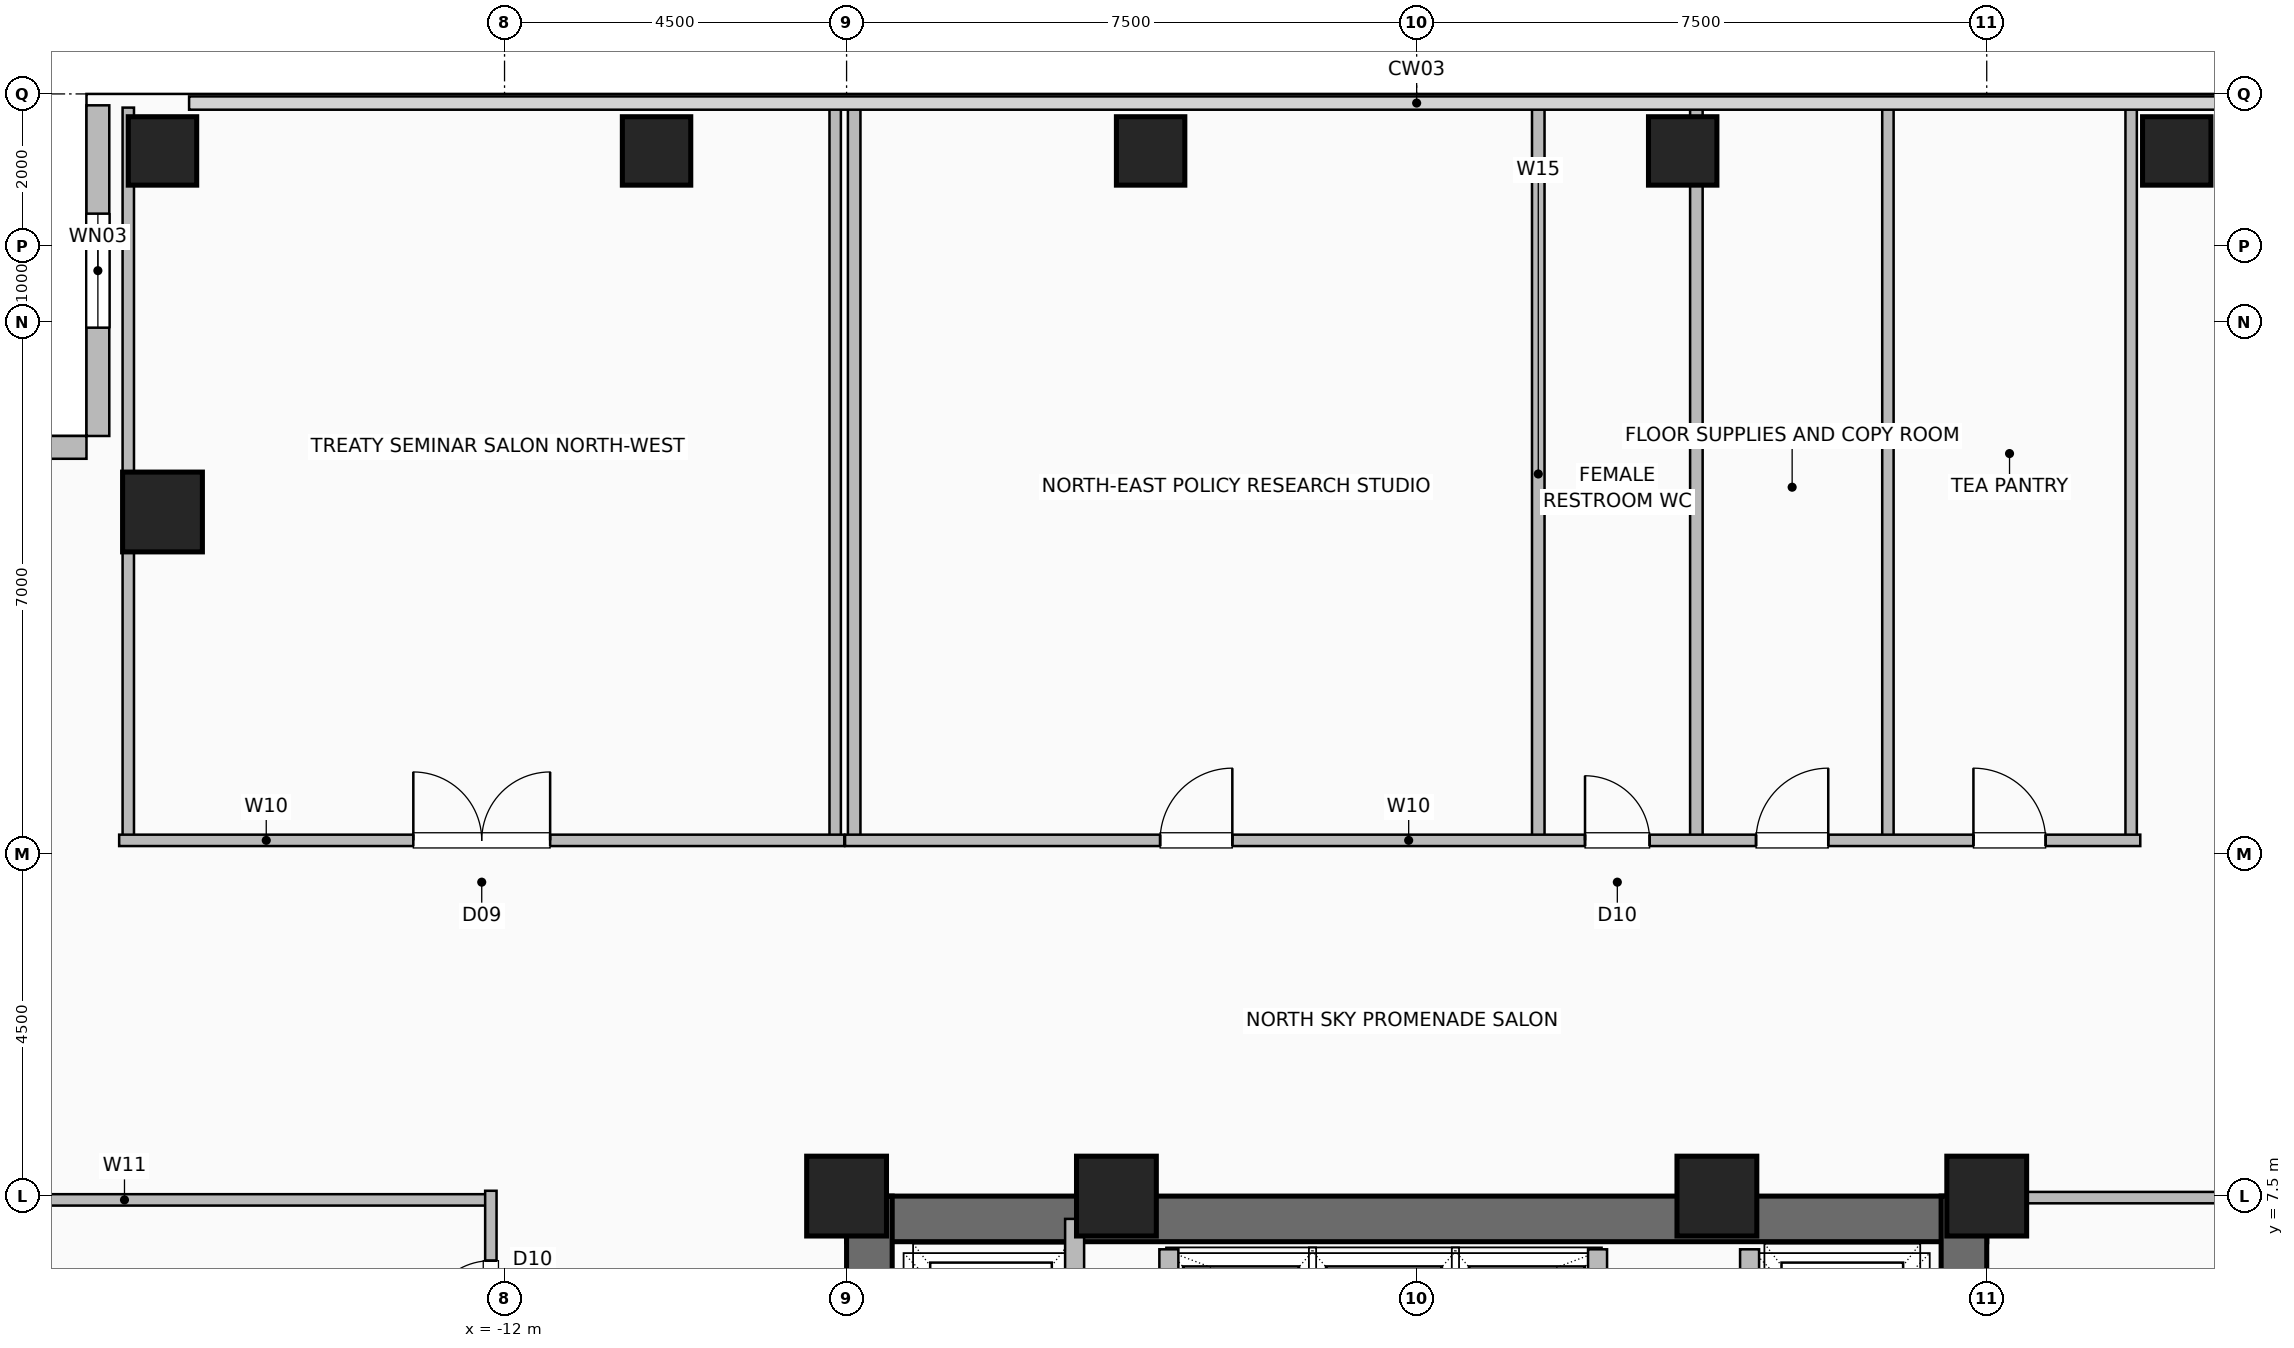
"""IFC4 building model, lengths in metres.
Left out: names, types, materials, properties, quantities, classifications, styles, units other than length and angle.
Written with IfcOpenShell. Run it as: python <this file> out.ifc"""

import sys

from ifc_helpers import new_model, si_unit, direction, frame, frame_2d, origin, origin_2d, place, context, subcontext, project, spatial, rectangle, hollow_rectangle, extrude, element, fill, save


model = new_model("IFC4")
c1 = context("Model", 3, precision=1e-05, world=origin(), true_north=direction((0.0, 1.0)))
c2 = subcontext(c1, "Body", "Model", "MODEL_VIEW")
j1 = project(units=[si_unit("LENGTHUNIT", "METRE"), si_unit("PLANEANGLEUNIT", "RADIAN")], contexts=[c1])
p1 = place(None, origin())
s1 = spatial("IfcSite", under=j1, at=p1, CompositionType="ELEMENT")
p2 = place(p1, origin())
s2 = spatial("IfcBuilding", under=s1, at=p2, CompositionType="ELEMENT")
p3 = place(p2, frame((0.0, 0.0, 97.6)))
s3 = spatial("IfcBuildingStorey", under=s2, at=p3, CompositionType="ELEMENT", Elevation=97.6)
for number, where, z_axis, x_axis in (
    (1, (7.5, 7.5, 0.0), (0.0, 0.0, 1.0), (1.0, 0.0, 0.0)),
    (2, (3.95, 7.5, 0.0), (0.0, 0.0, 1.0), (1.0, 0.0, 0.0)),
    (3, (-3.95, 7.5, 0.0), (0.0, 0.0, 1.0), (1.0, 0.0, 0.0)),
    (4, (-7.5, 7.5, 0.0), (0.0, 0.0, 1.0), (1.0, 0.0, 0.0)),
):
    element("IfcColumn", number, at=place(p3, frame(where, z_axis=z_axis, x_axis=x_axis)), inside=s3, PredefinedType="COLUMN", context=c2, shape_type="SweptSolid", body=[
        extrude(hollow_rectangle(XDim=1.05, YDim=1.05, WallThickness=0.05, at=origin_2d()), origin(), (0.0, 0.0, 1.0), 3.6),
    ])
for number, where, z_axis, x_axis in (
    (5, (-16.5, 21.25, 0.0), (0.0, 0.0, 1.0), (1.0, 0.0, 0.0)),
    (6, (-10.0, 21.25, 0.0), (0.0, 0.0, 1.0), (1.0, 0.0, 0.0)),
    (7, (-3.5, 21.25, 0.0), (0.0, 0.0, 1.0), (1.0, 0.0, 0.0)),
    (8, (3.5, 21.25, 0.0), (0.0, 0.0, 1.0), (1.0, 0.0, 0.0)),
    (9, (10.0, 21.25, 0.0), (0.0, 0.0, 1.0), (1.0, 0.0, 0.0)),
):
    element("IfcColumn", number, at=place(p3, frame(where, z_axis=z_axis, x_axis=x_axis)), inside=s3, PredefinedType="COLUMN", context=c2, shape_type="SweptSolid", body=[
        extrude(hollow_rectangle(XDim=0.9, YDim=0.9, WallThickness=0.045, at=origin_2d()), origin(), (0.0, 0.0, 1.0), 3.6),
    ])
p4 = place(p3, frame((-16.5, 16.5, 0.0), z_axis=(0.0, 0.0, 1.0), x_axis=(1.0, 0.0, 0.0)))
e10 = element("IfcColumn", 10, at=p4, inside=s3, PredefinedType="COLUMN", context=c2, shape_type="SweptSolid", body=[
    extrude(hollow_rectangle(XDim=1.05, YDim=1.05, WallThickness=0.05, at=origin_2d()), origin(), (0.0, 0.0, 1.0), 3.6),
])
p5 = place(p3, frame((-17.35, 21.85, 0.0), z_axis=(0.0, 0.0, 1.0), x_axis=(0.0, -1.0, 0.0)))
e11 = element("IfcWall", 11, at=p5, inside=s3, PredefinedType="SOLIDWALL", context=c2, shape_type="SweptSolid", body=[
    extrude(rectangle(XDim=4.35, YDim=0.3, at=frame_2d((2.175, 0.0))), origin(), (0.0, 0.0, 1.0), 3.36),
])
p6 = place(p5, frame((1.425, 0.0, 0.9)))
e12 = element("IfcOpeningElement", 12, at=p6, cuts=e11, PredefinedType="OPENING", context=c2, shape_type="SweptSolid", body=[
    extrude(rectangle(XDim=1.5, YDim=1.8, at=frame_2d((0.75, 0.9))), frame((0.0, 0.16, 0.0), z_axis=(0.0, -1.0, 0.0), x_axis=(1.0, 0.0, 0.0)), (0.0, 0.0, 1.0), 0.32),
])
p7 = place(p3, frame((-21.85, 17.35, 0.0), z_axis=(0.0, 0.0, 1.0), x_axis=(1.0, 0.0, 0.0)))
e13 = element("IfcWall", 13, at=p7, inside=s3, PredefinedType="SOLIDWALL", context=c2, shape_type="SweptSolid", body=[
    extrude(rectangle(XDim=4.35, YDim=0.3, at=frame_2d((2.175, 0.0))), origin(), (0.0, 0.0, 1.0), 3.36),
])
p8 = place(p3, frame((-7.5, 7.2, 0.0), z_axis=(0.0, 0.0, 1.0), x_axis=(1.0, 0.0, 0.0)))
e14 = element("IfcWall", 14, at=p8, inside=s3, PredefinedType="SHEAR", context=c2, shape_type="SweptSolid", body=[
    extrude(rectangle(XDim=15.0, YDim=0.6, at=frame_2d((7.5, 0.0))), origin(), (0.0, 0.0, 1.0), 3.36),
])
p9 = place(p3, frame((-7.2, -7.5, 0.0), z_axis=(0.0, 0.0, 1.0), x_axis=(0.0, 1.0, 0.0)))
e15 = element("IfcWall", 15, at=p9, inside=s3, PredefinedType="SHEAR", context=c2, shape_type="SweptSolid", body=[
    extrude(rectangle(XDim=15.0, YDim=0.6, at=frame_2d((7.5, 0.0))), origin(), (0.0, 0.0, 1.0), 3.36),
])
p10 = place(p9, frame((9.5, 0.0, 0.0)))
e16 = element("IfcOpeningElement", 16, at=p10, cuts=e15, PredefinedType="OPENING", context=c2, shape_type="SweptSolid", body=[
    extrude(rectangle(XDim=1.0, YDim=2.08, at=frame_2d((0.5, 1.04))), frame((0.0, 0.31, 0.0), z_axis=(0.0, -1.0, 0.0), x_axis=(1.0, 0.0, 0.0)), (0.0, 0.0, 1.0), 0.62),
])
p11 = place(p3, frame((7.2, -7.5, 0.0), z_axis=(0.0, 0.0, 1.0), x_axis=(0.0, 1.0, 0.0)))
e17 = element("IfcWall", 17, at=p11, inside=s3, PredefinedType="SHEAR", context=c2, shape_type="SweptSolid", body=[
    extrude(rectangle(XDim=15.0, YDim=0.6, at=frame_2d((7.5, 0.0))), origin(), (0.0, 0.0, 1.0), 3.36),
])
for number, where, z_axis, x_axis in (
    (18, (-3.26, 4.58, 0.0), (0.0, 0.0, 1.0), (0.0, 1.0, 0.0)),
    (19, (2.38, 4.58, 0.0), (0.0, 0.0, 1.0), (0.0, 1.0, 0.0)),
):
    element("IfcWall", number, at=place(p3, frame(where, z_axis=z_axis, x_axis=x_axis)), inside=s3, PredefinedType="SHEAR", context=c2, shape_type="SweptSolid", body=[
        extrude(rectangle(XDim=2.22, YDim=0.25, at=frame_2d((1.11, 0.0))), origin(), (0.0, 0.0, 1.0), 3.36),
    ])
p12 = place(p3, frame((-4.5, 4.35, 0.0), z_axis=(0.0, 0.0, 1.0), x_axis=(0.0, 1.0, 0.0)))
e20 = element("IfcWall", 20, at=p12, inside=s3, PredefinedType="SHEAR", context=c2, shape_type="SweptSolid", body=[
    extrude(rectangle(XDim=2.85, YDim=0.25, at=frame_2d((1.425, 0.0))), origin(), (0.0, 0.0, 1.0), 3.36),
])
p13 = place(p3, frame((4.38, 4.3, 0.0), z_axis=(0.0, 0.0, 1.0), x_axis=(0.0, 1.0, 0.0)))
e21 = element("IfcWall", 21, at=p13, inside=s3, PredefinedType="SHEAR", context=c2, shape_type="SweptSolid", body=[
    extrude(rectangle(XDim=2.5, YDim=0.25, at=frame_2d((1.25, 0.0))), origin(), (0.0, 0.0, 1.0), 3.36),
])
p14 = place(p13, frame((0.8, 0.0, 0.0)))
e22 = element("IfcOpeningElement", 22, at=p14, cuts=e21, PredefinedType="OPENING", context=c2, shape_type="SweptSolid", body=[
    extrude(rectangle(XDim=1.2, YDim=2.2, at=frame_2d((0.6, 1.1))), frame((0.0, 0.135, 0.0), z_axis=(0.0, -1.0, 0.0), x_axis=(1.0, 0.0, 0.0)), (0.0, 0.0, 1.0), 0.27),
])
p15 = place(p3, frame((-21.82, 7.45, 0.0), z_axis=(0.0, 0.0, 1.0), x_axis=(1.0, 0.0, 0.0)))
e23 = element("IfcWall", 23, at=p15, inside=s3, PredefinedType="PARTITIONING", context=c2, shape_type="SweptSolid", body=[
    extrude(rectangle(XDim=9.64, YDim=0.15, at=frame_2d((4.82, 0.0))), origin(), (0.0, 0.0, 1.0), 3.36),
])
p16 = place(p3, frame((-12.18, -7.57, 0.0), z_axis=(0.0, 0.0, 1.0), x_axis=(0.0, 1.0, 0.0)))
e24 = element("IfcWall", 24, at=p16, inside=s3, PredefinedType="PARTITIONING", context=c2, shape_type="SweptSolid", body=[
    extrude(rectangle(XDim=15.14, YDim=0.15, at=frame_2d((7.57, 0.0))), origin(), (0.0, 0.0, 1.0), 3.36),
])
p17 = place(p16, frame((2.62, 0.0, 0.0)))
e25 = element("IfcOpeningElement", 25, at=p17, cuts=e24, PredefinedType="OPENING", context=c2, shape_type="SweptSolid", body=[
    extrude(rectangle(XDim=0.95, YDim=2.06, at=frame_2d((0.475, 1.03))), frame((0.0, 0.085, 0.0), z_axis=(0.0, -1.0, 0.0), x_axis=(1.0, 0.0, 0.0)), (0.0, 0.0, 1.0), 0.17),
])
p18 = place(p16, frame((8.845, 0.0, 0.0)))
e26 = element("IfcOpeningElement", 26, at=p18, cuts=e24, PredefinedType="OPENING", context=c2, shape_type="SweptSolid", body=[
    extrude(rectangle(XDim=0.95, YDim=2.06, at=frame_2d((0.475, 1.03))), frame((0.0, 0.085, 0.0), z_axis=(0.0, -1.0, 0.0), x_axis=(1.0, 0.0, 0.0)), (0.0, 0.0, 1.0), 0.17),
])
p19 = place(p16, frame((13.37, 0.0, 0.0)))
e27 = element("IfcOpeningElement", 27, at=p19, cuts=e24, PredefinedType="OPENING", context=c2, shape_type="SweptSolid", body=[
    extrude(rectangle(XDim=0.85, YDim=2.05, at=frame_2d((0.425, 1.025))), frame((0.0, 0.085, 0.0), z_axis=(0.0, -1.0, 0.0), x_axis=(1.0, 0.0, 0.0)), (0.0, 0.0, 1.0), 0.17),
])
for number, where, z_axis, x_axis in (
    (28, (-16.95, 12.18, 0.0), (0.0, 0.0, 1.0), (0.0, 1.0, 0.0)),
    (29, (-7.65, 12.18, 0.0), (0.0, 0.0, 1.0), (0.0, 1.0, 0.0)),
):
    element("IfcWall", number, at=place(p3, frame(where, z_axis=z_axis, x_axis=x_axis)), inside=s3, PredefinedType="PARTITIONING", context=c2, shape_type="SweptSolid", body=[
        extrude(rectangle(XDim=9.64, YDim=0.15, at=frame_2d((4.82, 0.0))), origin(), (0.0, 0.0, 1.0), 3.36),
    ])
p20 = place(p3, frame((-17.07, 12.18, 0.0), z_axis=(0.0, 0.0, 1.0), x_axis=(1.0, 0.0, 0.0)))
e30 = element("IfcWall", 30, at=p20, inside=s3, PredefinedType="PARTITIONING", context=c2, shape_type="SweptSolid", body=[
    extrude(rectangle(XDim=9.54, YDim=0.15, at=frame_2d((4.77, 0.0))), origin(), (0.0, 0.0, 1.0), 3.36),
])
p21 = place(p20, frame((3.87, 0.0, 0.0)))
e31 = element("IfcOpeningElement", 31, at=p21, cuts=e30, PredefinedType="OPENING", context=c2, shape_type="SweptSolid", body=[
    extrude(rectangle(XDim=1.8, YDim=2.08, at=frame_2d((0.9, 1.04))), frame((0.0, 0.085, 0.0), z_axis=(0.0, -1.0, 0.0), x_axis=(1.0, 0.0, 0.0)), (0.0, 0.0, 1.0), 0.17),
])
for number, where, z_axis, x_axis in (
    (32, (3.68, 12.18, 0.0), (0.0, 0.0, 1.0), (0.0, 1.0, 0.0)),
    (33, (-7.4, 12.18, 0.0), (0.0, 0.0, 1.0), (0.0, 1.0, 0.0)),
    (34, (1.6, 12.18, 0.0), (0.0, 0.0, 1.0), (0.0, 1.0, 0.0)),
):
    element("IfcWall", number, at=place(p3, frame(where, z_axis=z_axis, x_axis=x_axis)), inside=s3, PredefinedType="PLUMBINGWALL", context=c2, shape_type="SweptSolid", body=[
        extrude(rectangle(XDim=9.64, YDim=0.165, at=frame_2d((4.82, 0.0))), origin(), (0.0, 0.0, 1.0), 3.36),
    ])
for number, where, z_axis, x_axis in (
    (35, (6.2, 12.18, 0.0), (0.0, 0.0, 1.0), (0.0, 1.0, 0.0)),
    (36, (9.4, 12.18, 0.0), (0.0, 0.0, 1.0), (0.0, 1.0, 0.0)),
):
    element("IfcWall", number, at=place(p3, frame(where, z_axis=z_axis, x_axis=x_axis)), inside=s3, PredefinedType="PARTITIONING", context=c2, shape_type="SweptSolid", body=[
        extrude(rectangle(XDim=9.64, YDim=0.15, at=frame_2d((4.82, 0.0))), origin(), (0.0, 0.0, 1.0), 3.36),
    ])
p22 = place(p3, frame((-7.52, 12.18, 0.0), z_axis=(0.0, 0.0, 1.0), x_axis=(1.0, 0.0, 0.0)))
e37 = element("IfcWall", 37, at=p22, inside=s3, PredefinedType="PARTITIONING", context=c2, shape_type="SweptSolid", body=[
    extrude(rectangle(XDim=17.04, YDim=0.15, at=frame_2d((8.52, 0.0))), origin(), (0.0, 0.0, 1.0), 3.36),
])
p23 = place(p22, frame((4.145, 0.0, 0.0)))
e38 = element("IfcOpeningElement", 38, at=p23, cuts=e37, PredefinedType="OPENING", context=c2, shape_type="SweptSolid", body=[
    extrude(rectangle(XDim=0.95, YDim=2.06, at=frame_2d((0.475, 1.03))), frame((0.0, 0.085, 0.0), z_axis=(0.0, -1.0, 0.0), x_axis=(1.0, 0.0, 0.0)), (0.0, 0.0, 1.0), 0.17),
])
p24 = place(p22, frame((9.735, 0.0, 0.0)))
e39 = element("IfcOpeningElement", 39, at=p24, cuts=e37, PredefinedType="OPENING", context=c2, shape_type="SweptSolid", body=[
    extrude(rectangle(XDim=0.85, YDim=2.05, at=frame_2d((0.425, 1.025))), frame((0.0, 0.085, 0.0), z_axis=(0.0, -1.0, 0.0), x_axis=(1.0, 0.0, 0.0)), (0.0, 0.0, 1.0), 0.17),
])
p25 = place(p22, frame((11.985, 0.0, 0.0)))
e40 = element("IfcOpeningElement", 40, at=p25, cuts=e37, PredefinedType="OPENING", context=c2, shape_type="SweptSolid", body=[
    extrude(rectangle(XDim=0.95, YDim=2.06, at=frame_2d((0.475, 1.03))), frame((0.0, 0.085, 0.0), z_axis=(0.0, -1.0, 0.0), x_axis=(1.0, 0.0, 0.0)), (0.0, 0.0, 1.0), 0.17),
])
p26 = place(p22, frame((14.845, 0.0, 0.0)))
e41 = element("IfcOpeningElement", 41, at=p26, cuts=e37, PredefinedType="OPENING", context=c2, shape_type="SweptSolid", body=[
    extrude(rectangle(XDim=0.95, YDim=2.06, at=frame_2d((0.475, 1.03))), frame((0.0, 0.085, 0.0), z_axis=(0.0, -1.0, 0.0), x_axis=(1.0, 0.0, 0.0)), (0.0, 0.0, 1.0), 0.17),
])
p27 = place(p3, frame((7.6, 7.48, 0.0), z_axis=(0.0, 0.0, 1.0), x_axis=(1.0, 0.0, 0.0)))
e42 = element("IfcWall", 42, at=p27, inside=s3, PredefinedType="PARTITIONING", context=c2, shape_type="SweptSolid", body=[
    extrude(rectangle(XDim=14.22, YDim=0.15, at=frame_2d((7.11, 0.0))), origin(), (0.0, 0.0, 1.0), 3.36),
])
p28 = place(p6, origin())
e43 = element("IfcWindow", 43, at=p28, inside=s3, PartitioningType="SINGLE_PANEL", PredefinedType="WINDOW", context=c2, shape_type="SweptSolid", body=[
    extrude(rectangle(XDim=1.5, YDim=1.8, at=frame_2d((0.75, 0.9))), frame((0.0, 0.03, 0.0), z_axis=(0.0, -1.0, 0.0), x_axis=(1.0, 0.0, 0.0)), (0.0, 0.0, 1.0), 0.06),
])
fill(e12, e43)
p29 = place(p19, origin())
e44 = element("IfcDoor", 44, at=p29, inside=s3, OperationType="SINGLE_SWING_LEFT", PredefinedType="DOOR", context=c2, shape_type="SweptSolid", body=[
    extrude(rectangle(XDim=0.85, YDim=2.05, at=frame_2d((0.425, 1.025))), frame((0.0, 0.025, 0.0), z_axis=(0.0, -1.0, 0.0), x_axis=(1.0, 0.0, 0.0)), (0.0, 0.0, 1.0), 0.05),
])
fill(e27, e44)
p30 = place(p21, origin())
e45 = element("IfcDoor", 45, at=p30, inside=s3, OperationType="DOUBLE_DOOR_SINGLE_SWING", PredefinedType="DOOR", context=c2, shape_type="SweptSolid", body=[
    extrude(rectangle(XDim=1.8, YDim=2.08, at=frame_2d((0.9, 1.04))), frame((0.0, 0.025, 0.0), z_axis=(0.0, -1.0, 0.0), x_axis=(1.0, 0.0, 0.0)), (0.0, 0.0, 1.0), 0.05),
])
fill(e31, e45)
p31 = place(p23, origin())
e46 = element("IfcDoor", 46, at=p31, inside=s3, OperationType="SINGLE_SWING_RIGHT", PredefinedType="DOOR", context=c2, shape_type="SweptSolid", body=[
    extrude(rectangle(XDim=0.95, YDim=2.06, at=frame_2d((0.475, 1.03))), frame((0.0, 0.025, 0.0), z_axis=(0.0, -1.0, 0.0), x_axis=(1.0, 0.0, 0.0)), (0.0, 0.0, 1.0), 0.05),
])
fill(e38, e46)
p32 = place(p24, origin())
e47 = element("IfcDoor", 47, at=p32, inside=s3, OperationType="SINGLE_SWING_LEFT", PredefinedType="DOOR", context=c2, shape_type="SweptSolid", body=[
    extrude(rectangle(XDim=0.85, YDim=2.05, at=frame_2d((0.425, 1.025))), frame((0.0, 0.025, 0.0), z_axis=(0.0, -1.0, 0.0), x_axis=(1.0, 0.0, 0.0)), (0.0, 0.0, 1.0), 0.05),
])
fill(e39, e47)
p33 = place(p25, origin())
e48 = element("IfcDoor", 48, at=p33, inside=s3, OperationType="SINGLE_SWING_RIGHT", PredefinedType="DOOR", context=c2, shape_type="SweptSolid", body=[
    extrude(rectangle(XDim=0.95, YDim=2.06, at=frame_2d((0.475, 1.03))), frame((0.0, 0.025, 0.0), z_axis=(0.0, -1.0, 0.0), x_axis=(1.0, 0.0, 0.0)), (0.0, 0.0, 1.0), 0.05),
])
fill(e40, e48)
p34 = place(p26, origin())
e49 = element("IfcDoor", 49, at=p34, inside=s3, OperationType="SINGLE_SWING_LEFT", PredefinedType="DOOR", context=c2, shape_type="SweptSolid", body=[
    extrude(rectangle(XDim=0.95, YDim=2.06, at=frame_2d((0.475, 1.03))), frame((0.0, 0.025, 0.0), z_axis=(0.0, -1.0, 0.0), x_axis=(1.0, 0.0, 0.0)), (0.0, 0.0, 1.0), 0.05),
])
fill(e41, e49)
save(model, sys.argv[1])
